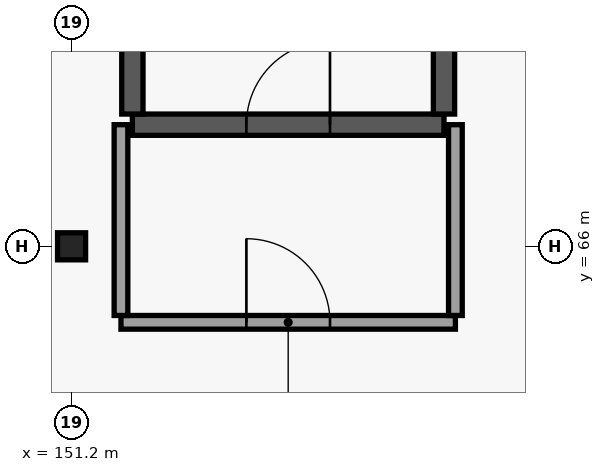
"""IFC4 building model, lengths in metres.
Left out: names, types, materials, properties, quantities, classifications, styles, units other than length and angle.
Written with IfcOpenShell. Run it as: python <this file> out.ifc"""

import sys

from ifc_helpers import new_model, si_unit, direction, frame, frame_2d, origin, origin_2d, place, context, subcontext, project, spatial, rectangle, i_section, extrude, element, fill, save


model = new_model("IFC4")
c1 = context("Model", 3, precision=1e-05, world=origin(), true_north=direction((0.0, 1.0)))
c2 = subcontext(c1, "Body", "Model", "MODEL_VIEW")
j1 = project(units=[si_unit("LENGTHUNIT", "METRE"), si_unit("PLANEANGLEUNIT", "RADIAN")], contexts=[c1])
p1 = place(None, origin())
s1 = spatial("IfcSite", under=j1, at=p1, CompositionType="ELEMENT")
p2 = place(p1, origin())
s2 = spatial("IfcBuilding", under=s1, at=p2, CompositionType="ELEMENT")
p3 = place(p2, frame((0.0, 0.0, 5.4)))
s3 = spatial("IfcBuildingStorey", under=s2, at=p3, CompositionType="ELEMENT", Elevation=5.4)
p4 = place(p3, frame((151.2, 66.0, 0.0), z_axis=(0.0, 0.0, 1.0), x_axis=(1.0, 0.0, 0.0)))
e1 = element("IfcColumn", 1, at=p4, inside=s3, PredefinedType="COLUMN", context=c2, shape_type="SweptSolid", body=[
    extrude(i_section(OverallWidth=0.369, OverallDepth=0.356, WebThickness=0.011, FlangeThickness=0.018, FilletRadius=0.015, at=origin_2d()), origin(), (0.0, 0.0, 1.0), 4.45),
])
p5 = place(p3, frame((152.0, 67.6, 0.0), z_axis=(0.0, 0.0, 1.0), x_axis=(1.0, 0.0, 0.0)))
e2 = element("IfcWall", 2, at=p5, inside=s3, PredefinedType="SHEAR", context=c2, shape_type="SweptSolid", body=[
    extrude(rectangle(XDim=4.1, YDim=0.28, at=frame_2d((2.05, 0.0))), origin(), (0.0, 0.0, 1.0), 4.45),
])
p6 = place(p5, frame((1.5, 0.0, 0.0)))
e3 = element("IfcOpeningElement", 3, at=p6, cuts=e2, PredefinedType="OPENING", context=c2, shape_type="SweptSolid", body=[
    extrude(rectangle(XDim=1.1, YDim=2.2, at=frame_2d((0.55, 1.1))), frame((0.0, 0.15, 0.0), z_axis=(0.0, -1.0, 0.0), x_axis=(1.0, 0.0, 0.0)), (0.0, 0.0, 1.0), 0.3),
])
for number, where, z_axis, x_axis in (
    (4, (152.0, 67.74, 0.0), (0.0, 0.0, 1.0), (0.0, 1.0, 0.0)),
    (5, (156.1, 67.74, 0.0), (0.0, 0.0, 1.0), (0.0, 1.0, 0.0)),
):
    element("IfcWall", number, at=place(p3, frame(where, z_axis=z_axis, x_axis=x_axis)), inside=s3, PredefinedType="SHEAR", context=c2, shape_type="SweptSolid", body=[
        extrude(rectangle(XDim=8.72, YDim=0.28, at=frame_2d((4.36, 0.0))), origin(), (0.0, 0.0, 1.0), 4.45),
    ])
p7 = place(p3, frame((151.85, 65.0, 0.0), z_axis=(0.0, 0.0, 1.0), x_axis=(1.0, 0.0, 0.0)))
e6 = element("IfcWall", 6, at=p7, inside=s3, PredefinedType="SOLIDWALL", context=c2, shape_type="SweptSolid", body=[
    extrude(rectangle(XDim=4.4, YDim=0.18, at=frame_2d((2.2, 0.0))), origin(), (0.0, 0.0, 1.0), 4.45),
])
p8 = place(p7, frame((1.65, 0.0, 0.0)))
e7 = element("IfcOpeningElement", 7, at=p8, cuts=e6, PredefinedType="OPENING", context=c2, shape_type="SweptSolid", body=[
    extrude(rectangle(XDim=1.1, YDim=2.2, at=frame_2d((0.55, 1.1))), frame((0.0, 0.1, 0.0), z_axis=(0.0, -1.0, 0.0), x_axis=(1.0, 0.0, 0.0)), (0.0, 0.0, 1.0), 0.2),
])
for number, where, z_axis, x_axis in (
    (8, (151.85, 65.09, 0.0), (0.0, 0.0, 1.0), (0.0, 1.0, 0.0)),
    (9, (156.25, 65.09, 0.0), (0.0, 0.0, 1.0), (0.0, 1.0, 0.0)),
):
    element("IfcWall", number, at=place(p3, frame(where, z_axis=z_axis, x_axis=x_axis)), inside=s3, PredefinedType="SOLIDWALL", context=c2, shape_type="SweptSolid", body=[
        extrude(rectangle(XDim=2.51, YDim=0.18, at=frame_2d((1.255, 0.0))), origin(), (0.0, 0.0, 1.0), 3.906),
    ])
p9 = place(p6, origin())
e10 = element("IfcDoor", 10, at=p9, inside=s3, OperationType="SINGLE_SWING_RIGHT", PredefinedType="DOOR", context=c2, shape_type="SweptSolid", body=[
    extrude(rectangle(XDim=1.1, YDim=2.2, at=frame_2d((0.55, 1.1))), frame((0.0, 0.025, 0.0), z_axis=(0.0, -1.0, 0.0), x_axis=(1.0, 0.0, 0.0)), (0.0, 0.0, 1.0), 0.05),
])
fill(e3, e10)
p10 = place(p8, origin())
e11 = element("IfcDoor", 11, at=p10, inside=s3, OperationType="SINGLE_SWING_LEFT", PredefinedType="DOOR", context=c2, shape_type="SweptSolid", body=[
    extrude(rectangle(XDim=1.1, YDim=2.2, at=frame_2d((0.55, 1.1))), frame((0.0, 0.025, 0.0), z_axis=(0.0, -1.0, 0.0), x_axis=(1.0, 0.0, 0.0)), (0.0, 0.0, 1.0), 0.05),
])
fill(e7, e11)
save(model, sys.argv[1])
